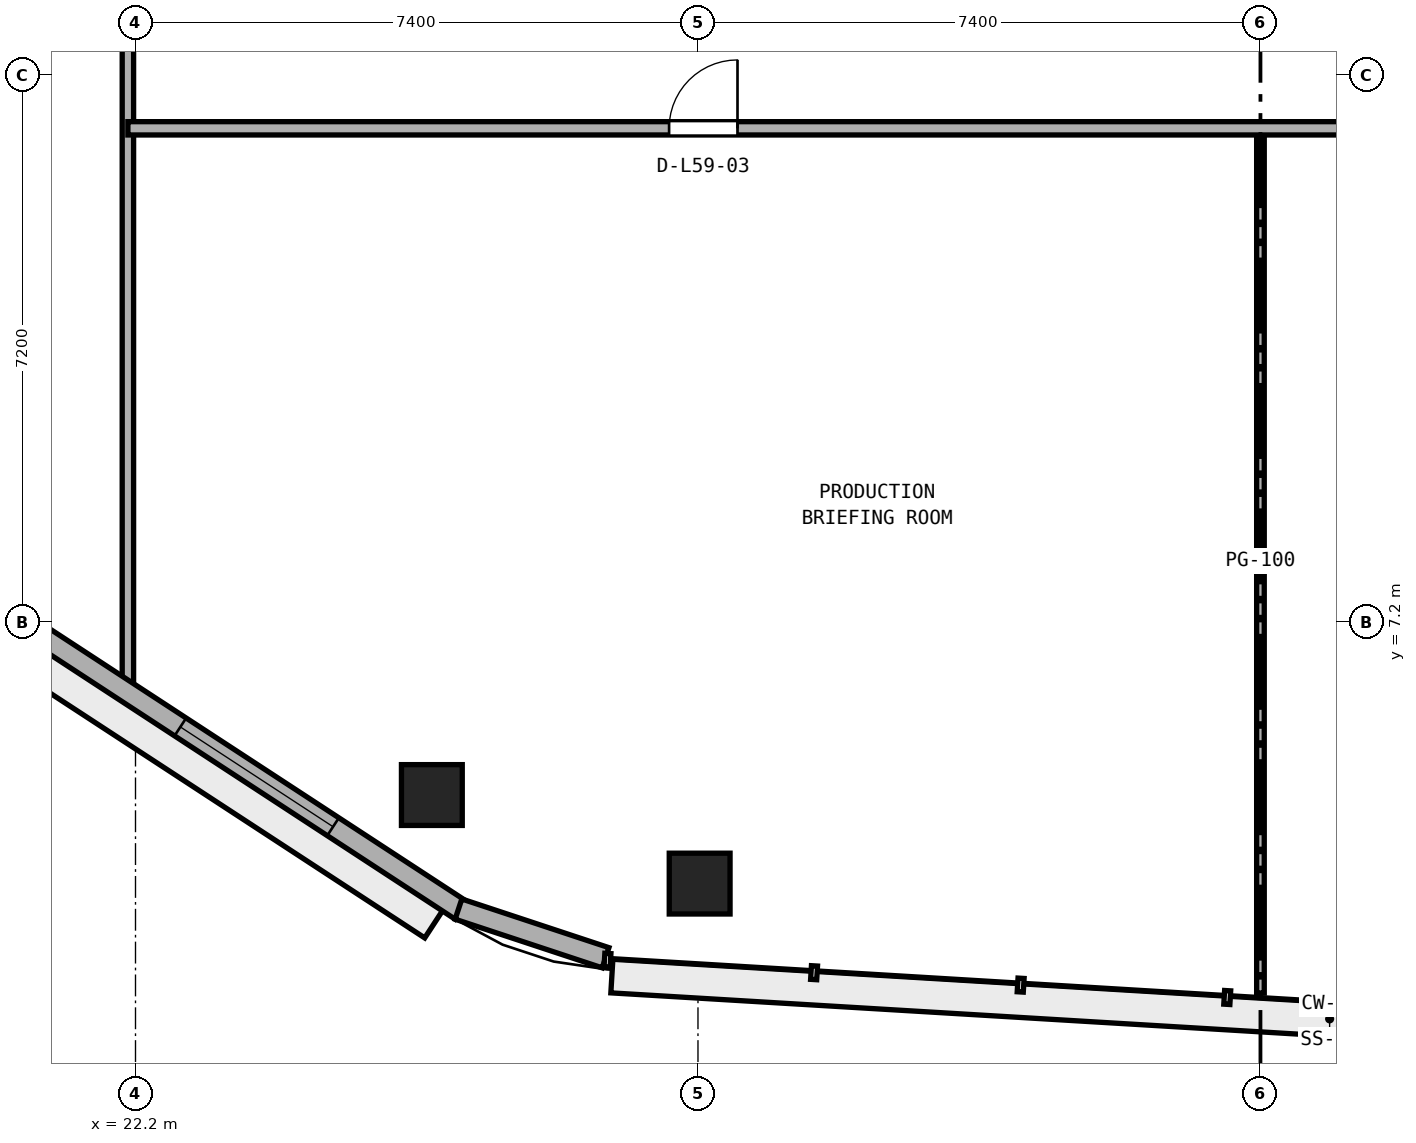
"""IFC4 building model, lengths in metres.
Left out: names, types, materials, properties, quantities, classifications, styles, units other than length and angle.
Written with IfcOpenShell. Run it as: python <this file> out.ifc"""

import sys

from ifc_helpers import new_model, si_unit, direction, frame, frame_2d, origin, origin_2d, place, context, subcontext, project, spatial, rectangle, extrude, element, fill, save


model = new_model("IFC4")
c1 = context("Model", 3, precision=1e-05, world=origin(), true_north=direction((0.0, 1.0)))
c2 = subcontext(c1, "Body", "Model", "MODEL_VIEW")
j1 = project(units=[si_unit("LENGTHUNIT", "METRE"), si_unit("PLANEANGLEUNIT", "RADIAN")], contexts=[c1])
p1 = place(None, origin())
s1 = spatial("IfcSite", under=j1, at=p1, CompositionType="ELEMENT")
p2 = place(p1, origin())
s2 = spatial("IfcBuilding", under=s1, at=p2, CompositionType="ELEMENT")
p3 = place(p2, frame((0.0, 0.0, 232.6)))
s3 = spatial("IfcBuildingStorey", under=s2, at=p3, CompositionType="ELEMENT", Elevation=232.6)
for number, where, z_axis, x_axis in (
    (1, (29.622, 3.764, 0.0), (0.0, 0.0, 1.0), (1.0, 0.0, 0.0)),
    (2, (26.099, 4.929, 0.0), (0.0, 0.0, 1.0), (1.0, 0.0, 0.0)),
):
    element("IfcColumn", number, at=place(p3, frame(where, z_axis=z_axis, x_axis=x_axis)), inside=s3, PredefinedType="COLUMN", context=c2, shape_type="SweptSolid", body=[
        extrude(rectangle(XDim=0.8, YDim=0.8, at=origin_2d()), origin(), (0.0, 0.0, 1.0), 3.8),
    ])
p4 = place(p3, frame((37.0, 2.323, 0.0), z_axis=(0.0, 0.0, 1.0), x_axis=(0.0, 1.0, 0.0)))
e3 = element("IfcWall", 3, at=p4, inside=s3, PredefinedType="PARTITIONING", context=c2, shape_type="SweptSolid", body=[
    extrude(rectangle(XDim=11.376, YDim=0.1, at=frame_2d((5.688, 0.0))), origin(), (0.0, 0.0, 1.0), 3.51),
])
p5 = place(p3, frame((22.1, 6.248, 0.0), z_axis=(0.0, 0.0, 1.0), x_axis=(0.0, 1.0, 0.0)))
e4 = element("IfcWall", 4, at=p5, inside=s3, PredefinedType="PARTITIONING", context=c2, shape_type="SweptSolid", body=[
    extrude(rectangle(XDim=30.452, YDim=0.15, at=frame_2d((15.226, 0.0))), origin(), (0.0, 0.0, 1.0), 3.51),
])
p6 = place(p5, frame((11.252, 0.0, 0.0)))
e5 = element("IfcOpeningElement", 5, at=p6, cuts=e4, PredefinedType="OPENING", context=c2, shape_type="SweptSolid", body=[
    extrude(rectangle(XDim=0.9, YDim=2.1, at=frame_2d((0.45, 1.05))), frame((0.0, 0.085, 0.0), z_axis=(0.0, -1.0, 0.0), x_axis=(1.0, 0.0, 0.0)), (0.0, 0.0, 1.0), 0.17),
])
p7 = place(p5, frame((21.077, 0.0, 0.0)))
e6 = element("IfcOpeningElement", 6, at=p7, cuts=e4, PredefinedType="OPENING", context=c2, shape_type="SweptSolid", body=[
    extrude(rectangle(XDim=0.9, YDim=2.1, at=frame_2d((0.45, 1.05))), frame((0.0, 0.085, 0.0), z_axis=(0.0, -1.0, 0.0), x_axis=(1.0, 0.0, 0.0)), (0.0, 0.0, 1.0), 0.17),
])
p8 = place(p3, frame((22.1, 13.7, 0.0), z_axis=(0.0, 0.0, 1.0), x_axis=(1.0, 0.0, 0.0)))
e7 = element("IfcWall", 7, at=p8, inside=s3, PredefinedType="PARTITIONING", context=c2, shape_type="SweptSolid", body=[
    extrude(rectangle(XDim=26.5, YDim=0.175, at=frame_2d((13.25, 0.0))), origin(), (0.0, 0.0, 1.0), 3.51),
])
p9 = place(p8, frame((7.12, 0.0, 0.0)))
e8 = element("IfcOpeningElement", 8, at=p9, cuts=e7, PredefinedType="OPENING", context=c2, shape_type="SweptSolid", body=[
    extrude(rectangle(XDim=0.9, YDim=2.1, at=frame_2d((0.45, 1.05))), frame((0.0, 0.097, 0.0), z_axis=(0.0, -1.0, 0.0), x_axis=(1.0, 0.0, 0.0)), (0.0, 0.0, 1.0), 0.195),
])
p10 = place(p8, frame((20.13, 0.0, 0.0)))
e9 = element("IfcOpeningElement", 9, at=p10, cuts=e7, PredefinedType="OPENING", context=c2, shape_type="SweptSolid", body=[
    extrude(rectangle(XDim=0.9, YDim=2.1, at=frame_2d((0.45, 1.05))), frame((0.0, 0.097, 0.0), z_axis=(0.0, -1.0, 0.0), x_axis=(1.0, 0.0, 0.0)), (0.0, 0.0, 1.0), 0.195),
])
p11 = place(p3, frame((12.034, 12.854, 0.0), z_axis=(0.0, 0.0, 1.0), x_axis=(0.837118352984, -0.547021812269, 0.0)))
e10 = element("IfcWall", 10, at=p11, inside=s3, PredefinedType="STANDARD", context=c2, shape_type="SweptSolid", body=[
    extrude(rectangle(XDim=17.259, YDim=0.28, at=frame_2d((8.63, 0.0))), origin(), (0.0, 0.0, 1.0), 3.51),
])
p12 = place(p11, frame((2.01, 0.0, 0.9)))
e11 = element("IfcOpeningElement", 11, at=p12, cuts=e10, PredefinedType="OPENING", context=c2, shape_type="SweptSolid", body=[
    extrude(rectangle(XDim=2.4, YDim=1.75, at=frame_2d((1.2, 0.875))), frame((0.0, 0.15, 0.0), z_axis=(0.0, -1.0, 0.0), x_axis=(1.0, 0.0, 0.0)), (0.0, 0.0, 1.0), 0.3),
])
p13 = place(p11, frame((7.43, 0.0, 0.9)))
e12 = element("IfcOpeningElement", 12, at=p13, cuts=e10, PredefinedType="OPENING", context=c2, shape_type="SweptSolid", body=[
    extrude(rectangle(XDim=2.4, YDim=1.75, at=frame_2d((1.2, 0.875))), frame((0.0, 0.15, 0.0), z_axis=(0.0, -1.0, 0.0), x_axis=(1.0, 0.0, 0.0)), (0.0, 0.0, 1.0), 0.3),
])
p14 = place(p11, frame((12.849, 0.0, 0.9)))
e13 = element("IfcOpeningElement", 13, at=p14, cuts=e10, PredefinedType="OPENING", context=c2, shape_type="SweptSolid", body=[
    extrude(rectangle(XDim=2.4, YDim=1.75, at=frame_2d((1.2, 0.875))), frame((0.0, 0.15, 0.0), z_axis=(0.0, -1.0, 0.0), x_axis=(1.0, 0.0, 0.0)), (0.0, 0.0, 1.0), 0.3),
])
p15 = place(p3, frame((26.449, 3.428, 0.0), z_axis=(0.0, 0.0, 1.0), x_axis=(0.949447063244, -0.313927179609, 0.0)))
e14 = element("IfcWall", 14, at=p15, inside=s3, PredefinedType="STANDARD", context=c2, shape_type="SweptSolid", body=[
    extrude(rectangle(XDim=2.038, YDim=0.28, at=frame_2d((1.019, 0.0))), origin(), (0.0, 0.0, 1.0), 3.51),
])
p16 = place(p9, origin())
e15 = element("IfcDoor", 15, at=p16, inside=s3, OperationType="SINGLE_SWING_RIGHT", PredefinedType="DOOR", context=c2, shape_type="SweptSolid", body=[
    extrude(rectangle(XDim=0.9, YDim=2.1, at=frame_2d((0.45, 1.05))), frame((0.0, 0.025, 0.0), z_axis=(0.0, -1.0, 0.0), x_axis=(1.0, 0.0, 0.0)), (0.0, 0.0, 1.0), 0.05),
])
fill(e8, e15)
p17 = place(p14, origin())
e16 = element("IfcWindow", 16, at=p17, inside=s3, PartitioningType="SINGLE_PANEL", PredefinedType="WINDOW", context=c2, shape_type="SweptSolid", body=[
    extrude(rectangle(XDim=2.4, YDim=1.75, at=frame_2d((1.2, 0.875))), frame((0.0, 0.03, 0.0), z_axis=(0.0, -1.0, 0.0), x_axis=(1.0, 0.0, 0.0)), (0.0, 0.0, 1.0), 0.06),
])
fill(e13, e16)
save(model, sys.argv[1])
